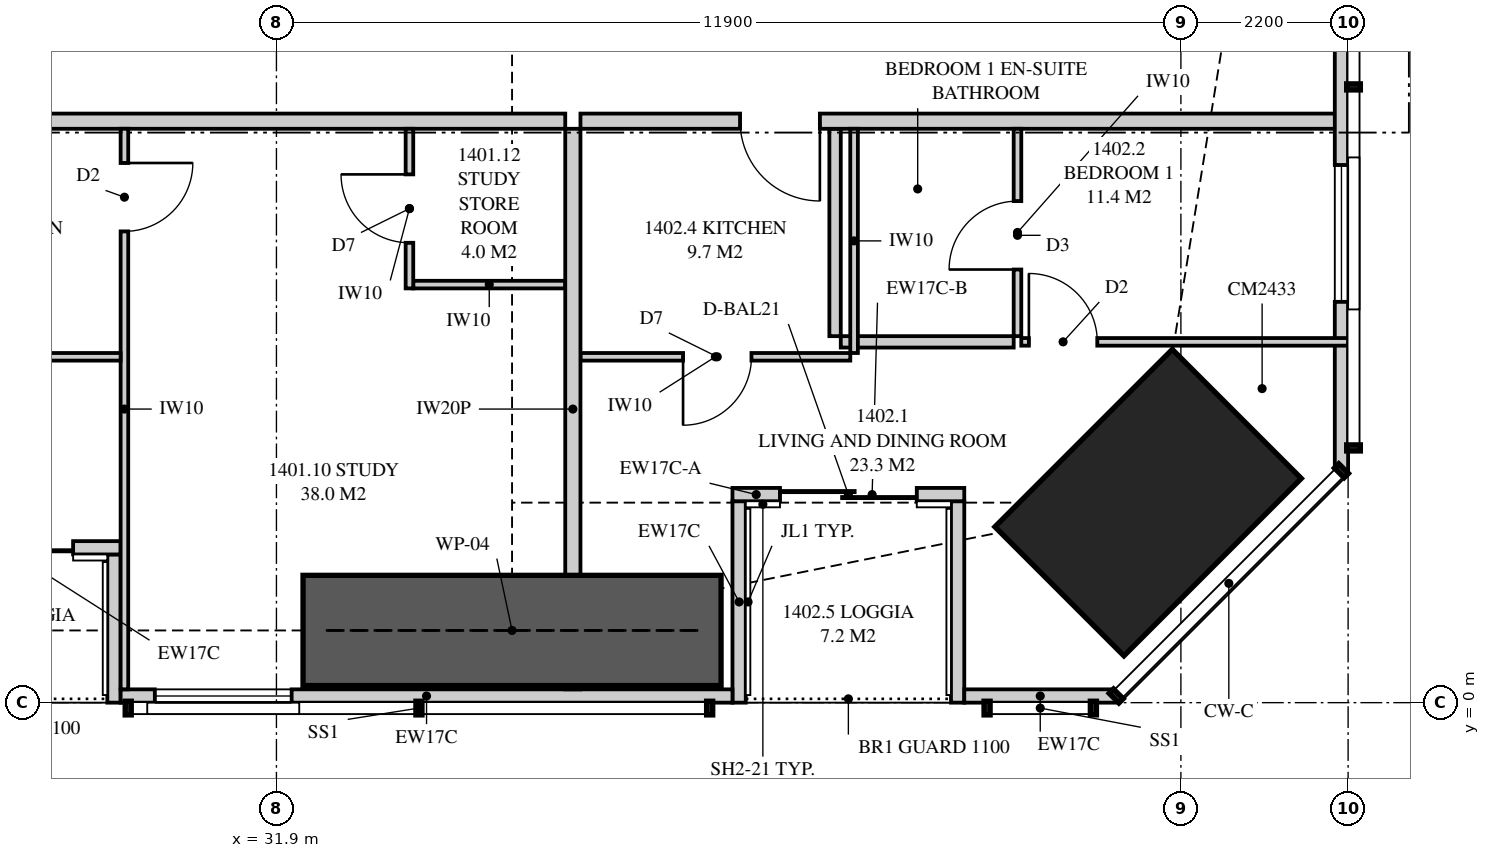
"""IFC4 building model, lengths in metres.
Left out: names, types, materials, properties, quantities, classifications, styles, units other than length and angle.
Written with IfcOpenShell. Run it as: python <this file> out.ifc"""

import sys

from ifc_helpers import new_model, si_unit, direction, frame, frame_2d, origin, origin_2d, place, context, subcontext, project, spatial, polyline, rectangle, outline, extrude, element, fill, save


model = new_model("IFC4")
c1 = context("Model", 3, precision=1e-05, world=origin(), true_north=direction((0.0, 1.0)))
c2 = subcontext(c1, "Body", "Model", "MODEL_VIEW")
j1 = project(units=[si_unit("LENGTHUNIT", "METRE"), si_unit("PLANEANGLEUNIT", "RADIAN")], contexts=[c1])
p1 = place(None, origin())
s1 = spatial("IfcSite", under=j1, at=p1, CompositionType="ELEMENT")
p2 = place(p1, origin())
s2 = spatial("IfcBuilding", under=s1, at=p2, CompositionType="ELEMENT")
p3 = place(p2, frame((0.0, 0.0, 54.5)))
s3 = spatial("IfcBuildingStorey", under=s2, at=p3, CompositionType="ELEMENT", Elevation=54.5)
p4 = place(p3, frame((43.369, 2.631, 0.0), z_axis=(0.0, 0.0, 1.0), x_axis=(-0.707106781187, 0.707106781187, 0.0)))
e1 = element("IfcColumn", 1, at=p4, inside=s3, PredefinedType="COLUMN", context=c2, shape_type="SweptSolid", body=[
    extrude(rectangle(XDim=2.4, YDim=3.3, at=origin_2d()), origin(), (0.0, 0.0, 1.0), 3.35),
])
p5 = place(p3, frame((29.85, 0.087, 0.0), z_axis=(0.0, 0.0, 1.0), x_axis=(1.0, 0.0, 0.0)))
e2 = element("IfcWall", 2, at=p5, inside=s3, PredefinedType="SOLIDWALL", context=c2, shape_type="SweptSolid", body=[
    extrude(outline(polyline([(0.0, 0.0), (8.05, 0.0), (8.05, 3.11), (5.354, 3.11), (5.354, 2.15), (5.306, 2.15), (5.306, 3.11), (5.15, 3.11), (5.15, 2.15), (0.0, 2.15), (0.0, 0.0)])), frame((0.0, 0.087, 0.0), z_axis=(0.0, -1.0, 0.0), x_axis=(1.0, 0.0, 0.0)), (0.0, 0.0, 1.0), 0.175),
])
p6 = place(p5, frame((0.45, 0.0, 0.4)))
e3 = element("IfcOpeningElement", 3, at=p6, cuts=e2, PredefinedType="OPENING", context=c2, shape_type="SweptSolid", body=[
    extrude(rectangle(XDim=1.8, YDim=1.7, at=frame_2d((0.9, 0.85))), frame((0.0, 0.097, 0.0), z_axis=(0.0, -1.0, 0.0), x_axis=(1.0, 0.0, 0.0)), (0.0, 0.0, 1.0), 0.195),
])
p7 = place(p3, frame((40.95, 0.087, 0.0), z_axis=(0.0, 0.0, 1.0), x_axis=(1.0, 0.0, 0.0)))
e4 = element("IfcWall", 4, at=p7, inside=s3, PredefinedType="SOLIDWALL", context=c2, shape_type="SweptSolid", body=[
    extrude(rectangle(XDim=1.999, YDim=0.175, at=frame_2d((1.0, 0.0))), origin(), (0.0, 0.0, 1.0), 3.11),
])
p8 = place(p3, frame((26.8, 2.038, 0.0), z_axis=(0.0, 0.0, 1.0), x_axis=(1.0, 0.0, 0.0)))
e5 = element("IfcWall", 5, at=p8, inside=s3, PredefinedType="SOLIDWALL", context=c2, shape_type="SweptSolid", body=[
    extrude(rectangle(XDim=3.05, YDim=0.175, at=frame_2d((1.525, 0.0))), origin(), (0.0, 0.0, 1.0), 3.11),
])
p9 = place(p8, frame((0.625, 0.0, 0.0)))
e6 = element("IfcOpeningElement", 6, at=p9, cuts=e5, PredefinedType="OPENING", context=c2, shape_type="SweptSolid", body=[
    extrude(rectangle(XDim=1.8, YDim=2.1, at=frame_2d((0.9, 1.05))), frame((0.0, 0.097, 0.0), z_axis=(0.0, -1.0, 0.0), x_axis=(1.0, 0.0, 0.0)), (0.0, 0.0, 1.0), 0.195),
])
p10 = place(p3, frame((29.762, 0.0, 0.0), z_axis=(0.0, 0.0, 1.0), x_axis=(0.0, 1.0, 0.0)))
e7 = element("IfcWall", 7, at=p10, inside=s3, PredefinedType="SOLIDWALL", context=c2, shape_type="SweptSolid", body=[
    extrude(outline(polyline([(0.0, 0.0), (1.95, 0.0), (1.95, 3.11), (1.75, 3.11), (1.75, 2.15), (0.15, 2.15), (0.15, 3.11), (0.0, 3.11), (0.0, 0.0)])), frame((0.0, 0.087, 0.0), z_axis=(0.0, -1.0, 0.0), x_axis=(1.0, 0.0, 0.0)), (0.0, 0.0, 1.0), 0.175),
])
p11 = place(p3, frame((37.9, 2.738, 0.0), z_axis=(0.0, 0.0, 1.0), x_axis=(1.0, 0.0, 0.0)))
e8 = element("IfcWall", 8, at=p11, inside=s3, PredefinedType="SOLIDWALL", context=c2, shape_type="SweptSolid", body=[
    extrude(rectangle(XDim=0.625, YDim=0.175, at=frame_2d((0.312, 0.0))), origin(), (0.0, 0.0, 1.0), 2.51),
])
p12 = place(p3, frame((38.525, 2.738, 0.0), z_axis=(0.0, 0.0, 1.0), x_axis=(1.0, 0.0, 0.0)))
e9 = element("IfcWall", 9, at=p12, inside=s3, PredefinedType="SOLIDWALL", context=c2, shape_type="SweptSolid", body=[
    extrude(rectangle(XDim=2.425, YDim=0.175, at=frame_2d((1.212, 0.0))), origin(), (0.0, 0.0, 1.0), 2.15),
])
p13 = place(p12, origin())
e10 = element("IfcOpeningElement", 10, at=p13, cuts=e9, PredefinedType="OPENING", context=c2, shape_type="SweptSolid", body=[
    extrude(rectangle(XDim=1.8, YDim=2.1, at=frame_2d((0.9, 1.05))), frame((0.0, 0.097, 0.0), z_axis=(0.0, -1.0, 0.0), x_axis=(1.0, 0.0, 0.0)), (0.0, 0.0, 1.0), 0.195),
])
p14 = place(p3, frame((37.988, 0.0, 0.0), z_axis=(0.0, 0.0, 1.0), x_axis=(0.0, 1.0, 0.0)))
e11 = element("IfcWall", 11, at=p14, inside=s3, PredefinedType="SOLIDWALL", context=c2, shape_type="SweptSolid", body=[
    extrude(outline(polyline([(0.0, 0.0), (2.65, 0.0), (2.65, 2.51), (2.384, 2.51), (2.384, 2.15), (0.717, 2.15), (0.717, 3.11), (0.0, 3.11), (0.0, 0.0)])), frame((0.0, 0.087, 0.0), z_axis=(0.0, -1.0, 0.0), x_axis=(1.0, 0.0, 0.0)), (0.0, 0.0, 1.0), 0.175),
])
p15 = place(p3, frame((40.863, 0.0, 0.0), z_axis=(0.0, 0.0, 1.0), x_axis=(0.0, 1.0, 0.0)))
e12 = element("IfcWall", 12, at=p15, inside=s3, PredefinedType="SOLIDWALL", context=c2, shape_type="SweptSolid", body=[
    extrude(outline(polyline([(0.0, 0.0), (2.65, 0.0), (2.65, 2.15), (1.294, 2.15), (1.294, 3.11), (0.0, 3.11), (0.0, 0.0)])), frame((0.0, 0.087, 0.0), z_axis=(0.0, -1.0, 0.0), x_axis=(1.0, 0.0, 0.0)), (0.0, 0.0, 1.0), 0.175),
])
p16 = place(p3, frame((45.913, 3.051, 0.0), z_axis=(0.0, 0.0, 1.0), x_axis=(0.0, 1.0, 0.0)))
e13 = element("IfcWall", 13, at=p16, inside=s3, PredefinedType="SOLIDWALL", context=c2, shape_type="SweptSolid", body=[
    extrude(outline(polyline([(0.0, 0.0), (31.897, 0.0), (31.897, 3.11), (22.167, 3.11), (22.167, 2.15), (22.074, 2.15), (22.074, 3.11), (21.949, 3.11), (21.949, 2.15), (9.949, 2.15), (9.949, 3.11), (9.823, 3.11), (9.823, 2.15), (9.73, 2.15), (9.73, 3.11), (0.0, 3.11), (0.0, 0.0)])), frame((0.0, 0.087, 0.0), z_axis=(0.0, -1.0, 0.0), x_axis=(1.0, 0.0, 0.0)), (0.0, 0.0, 1.0), 0.175),
])
p17 = place(p16, frame((2.222, 0.0, 0.4)))
e14 = element("IfcOpeningElement", 14, at=p17, cuts=e13, PredefinedType="OPENING", context=c2, shape_type="SweptSolid", body=[
    extrude(rectangle(XDim=1.8, YDim=1.7, at=frame_2d((0.9, 0.85))), frame((0.0, 0.097, 0.0), z_axis=(0.0, -1.0, 0.0), x_axis=(1.0, 0.0, 0.0)), (0.0, 0.0, 1.0), 0.195),
])
p18 = place(p16, frame((14.849, 0.0, 0.4)))
e15 = element("IfcOpeningElement", 15, at=p18, cuts=e13, PredefinedType="OPENING", context=c2, shape_type="SweptSolid", body=[
    extrude(rectangle(XDim=1.2, YDim=1.7, at=frame_2d((0.6, 0.85))), frame((0.0, 0.097, 0.0), z_axis=(0.0, -1.0, 0.0), x_axis=(1.0, 0.0, 0.0)), (0.0, 0.0, 1.0), 0.195),
])
p19 = place(p16, frame((27.375, 0.0, 0.4)))
e16 = element("IfcOpeningElement", 16, at=p19, cuts=e13, PredefinedType="OPENING", context=c2, shape_type="SweptSolid", body=[
    extrude(rectangle(XDim=1.8, YDim=1.7, at=frame_2d((0.9, 0.85))), frame((0.0, 0.097, 0.0), z_axis=(0.0, -1.0, 0.0), x_axis=(1.0, 0.0, 0.0)), (0.0, 0.0, 1.0), 0.195),
])
p20 = place(p3, frame((35.8, 0.175, 0.0), z_axis=(0.0, 0.0, 1.0), x_axis=(0.0, 1.0, 0.0)))
e17 = element("IfcWall", 17, at=p20, inside=s3, PredefinedType="PARTITIONING", context=c2, shape_type="SweptSolid", body=[
    extrude(outline(polyline([(0.008, 3.11), (0.0, 3.11), (0.0, 0.0), (0.529, 0.0), (0.529, 0.957), (1.021, 0.957), (1.021, 0.0), (7.375, 0.0), (7.375, 3.11), (3.766, 3.11), (3.766, 2.51), (1.864, 2.51), (1.864, 2.15), (1.021, 2.15), (1.021, 1.193), (0.529, 1.193), (0.529, 2.15), (0.008, 2.15), (0.008, 3.11)])), frame((0.0, 0.1, 0.0), z_axis=(0.0, -1.0, 0.0), x_axis=(1.0, 0.0, 0.0)), (0.0, 0.0, 1.0), 0.2),
])
p21 = place(p3, frame((29.9, 0.175, 0.0), z_axis=(0.0, 0.0, 1.0), x_axis=(0.0, 1.0, 0.0)))
e18 = element("IfcWall", 18, at=p21, inside=s3, PredefinedType="PARTITIONING", context=c2, shape_type="SweptSolid", body=[
    extrude(outline(polyline([(0.0, 0.0), (7.375, 0.0), (7.375, 3.11), (1.635, 3.11), (1.635, 2.15), (0.0, 2.15), (0.0, 3.11), (0.0, 0.0)])), frame((0.0, 0.05, 0.0), z_axis=(0.0, -1.0, 0.0), x_axis=(1.0, 0.0, 0.0)), (0.0, 0.0, 1.0), 0.1),
])
p22 = place(p21, frame((6.025, 0.0, 0.0)))
e19 = element("IfcOpeningElement", 19, at=p22, cuts=e18, PredefinedType="OPENING", context=c2, shape_type="SweptSolid", body=[
    extrude(rectangle(XDim=0.9, YDim=2.1, at=frame_2d((0.45, 1.05))), frame((0.0, 0.06, 0.0), z_axis=(0.0, -1.0, 0.0), x_axis=(1.0, 0.0, 0.0)), (0.0, 0.0, 1.0), 0.12),
])
p23 = place(p3, frame((26.35, 4.55, 0.0), z_axis=(0.0, 0.0, 1.0), x_axis=(1.0, 0.0, 0.0)))
e20 = element("IfcWall", 20, at=p23, inside=s3, PredefinedType="PARTITIONING", context=c2, shape_type="SweptSolid", body=[
    extrude(rectangle(XDim=3.5, YDim=0.1, at=frame_2d((1.75, 0.0))), origin(), (0.0, 0.0, 1.0), 3.11),
])
p24 = place(p23, frame((1.3, 0.0, 0.0)))
e21 = element("IfcOpeningElement", 21, at=p24, cuts=e20, PredefinedType="OPENING", context=c2, shape_type="SweptSolid", body=[
    extrude(rectangle(XDim=0.9, YDim=2.1, at=frame_2d((0.45, 1.05))), frame((0.0, 0.06, 0.0), z_axis=(0.0, -1.0, 0.0), x_axis=(1.0, 0.0, 0.0)), (0.0, 0.0, 1.0), 0.12),
])
p25 = place(p3, frame((35.9, 7.65, 0.0), z_axis=(0.0, 0.0, 1.0), x_axis=(1.0, 0.0, 0.0)))
e22 = element("IfcWall", 22, at=p25, inside=s3, PredefinedType="PARTITIONING", context=c2, shape_type="SweptSolid", body=[
    extrude(outline(polyline([(0.0, 0.0), (10.1, 0.0), (10.1, 3.11), (9.204, 3.11), (9.204, 2.15), (7.361, 2.15), (7.361, 3.11), (0.0, 3.11), (0.0, 0.0)])), frame((0.0, 0.1, 0.0), z_axis=(0.0, -1.0, 0.0), x_axis=(1.0, 0.0, 0.0)), (0.0, 0.0, 1.0), 0.2),
])
p26 = place(p25, frame((2.1, 0.0, 0.0)))
e23 = element("IfcOpeningElement", 23, at=p26, cuts=e22, PredefinedType="OPENING", context=c2, shape_type="SweptSolid", body=[
    extrude(rectangle(XDim=1.05, YDim=2.2, at=frame_2d((0.525, 1.1))), frame((0.0, 0.11, 0.0), z_axis=(0.0, -1.0, 0.0), x_axis=(1.0, 0.0, 0.0)), (0.0, 0.0, 1.0), 0.22),
])
p27 = place(p3, frame((41.65, 4.822, 0.0), z_axis=(0.0, 0.0, 1.0), x_axis=(0.0, 1.0, 0.0)))
e24 = element("IfcWall", 24, at=p27, inside=s3, PredefinedType="PARTITIONING", context=c2, shape_type="SweptSolid", body=[
    extrude(rectangle(XDim=2.728, YDim=0.1, at=frame_2d((1.364, 0.0))), origin(), (0.0, 0.0, 1.0), 3.11),
])
p28 = place(p27, frame((0.877, 0.0, 0.0)))
e25 = element("IfcOpeningElement", 25, at=p28, cuts=e24, PredefinedType="OPENING", context=c2, shape_type="SweptSolid", body=[
    extrude(rectangle(XDim=0.9, YDim=2.1, at=frame_2d((0.45, 1.05))), frame((0.0, 0.06, 0.0), z_axis=(0.0, -1.0, 0.0), x_axis=(1.0, 0.0, 0.0)), (0.0, 0.0, 1.0), 0.12),
])
p29 = place(p3, frame((41.7, 4.747, 0.0), z_axis=(0.0, 0.0, 1.0), x_axis=(1.0, 0.0, 0.0)))
e26 = element("IfcWall", 26, at=p29, inside=s3, PredefinedType="PARTITIONING", context=c2, shape_type="SweptSolid", body=[
    extrude(outline(polyline([(0.0, 0.0), (4.3, 0.0), (4.3, 3.11), (2.883, 3.11), (2.883, 2.15), (1.14, 2.15), (1.14, 3.11), (0.0, 3.11), (0.0, 0.0)])), frame((0.0, 0.05, 0.0), z_axis=(0.0, -1.0, 0.0), x_axis=(1.0, 0.0, 0.0)), (0.0, 0.0, 1.0), 0.1),
])
p30 = place(p29, frame((0.1, 0.0, 0.0)))
e27 = element("IfcOpeningElement", 27, at=p30, cuts=e26, PredefinedType="OPENING", context=c2, shape_type="SweptSolid", body=[
    extrude(rectangle(XDim=0.9, YDim=2.1, at=frame_2d((0.45, 1.05))), frame((0.0, 0.06, 0.0), z_axis=(0.0, -1.0, 0.0), x_axis=(1.0, 0.0, 0.0)), (0.0, 0.0, 1.0), 0.12),
])
p31 = place(p3, frame((39.325, 4.747, 0.0), z_axis=(0.0, 0.0, 1.0), x_axis=(1.0, 0.0, 0.0)))
e28 = element("IfcWall", 28, at=p31, inside=s3, PredefinedType="PLUMBINGWALL", context=c2, shape_type="SweptSolid", body=[
    extrude(rectangle(XDim=2.275, YDim=0.15, at=frame_2d((1.138, 0.0))), origin(), (0.0, 0.0, 1.0), 3.11),
])
p32 = place(p3, frame((39.25, 4.822, 0.0), z_axis=(0.0, 0.0, 1.0), x_axis=(0.0, 1.0, 0.0)))
e29 = element("IfcWall", 29, at=p32, inside=s3, PredefinedType="PLUMBINGWALL", context=c2, shape_type="SweptSolid", body=[
    extrude(rectangle(XDim=2.728, YDim=0.15, at=frame_2d((1.364, 0.0))), origin(), (0.0, 0.0, 1.0), 3.11),
])
p33 = place(p3, frame((35.9, 4.55, 0.0), z_axis=(0.0, 0.0, 1.0), x_axis=(1.0, 0.0, 0.0)))
e30 = element("IfcWall", 30, at=p33, inside=s3, PredefinedType="PARTITIONING", context=c2, shape_type="SweptSolid", body=[
    extrude(rectangle(XDim=3.55, YDim=0.1, at=frame_2d((1.775, 0.0))), origin(), (0.0, 0.0, 1.0), 3.11),
])
p34 = place(p33, frame((1.35, 0.0, 0.0)))
e31 = element("IfcOpeningElement", 31, at=p34, cuts=e30, PredefinedType="OPENING", context=c2, shape_type="SweptSolid", body=[
    extrude(rectangle(XDim=0.9, YDim=2.1, at=frame_2d((0.45, 1.05))), frame((0.0, 0.06, 0.0), z_axis=(0.0, -1.0, 0.0), x_axis=(1.0, 0.0, 0.0)), (0.0, 0.0, 1.0), 0.12),
])
p35 = place(p3, frame((39.5, 4.6, 0.0), z_axis=(0.0, 0.0, 1.0), x_axis=(0.0, 1.0, 0.0)))
e32 = element("IfcWall", 32, at=p35, inside=s3, PredefinedType="PARTITIONING", context=c2, shape_type="SweptSolid", body=[
    extrude(rectangle(XDim=2.95, YDim=0.1, at=frame_2d((1.475, 0.0))), origin(), (0.0, 0.0, 1.0), 3.11),
])
p36 = place(p3, frame((24.05, 7.65, 0.0), z_axis=(0.0, 0.0, 1.0), x_axis=(1.0, 0.0, 0.0)))
e33 = element("IfcWall", 33, at=p36, inside=s3, PredefinedType="PARTITIONING", context=c2, shape_type="SweptSolid", body=[
    extrude(outline(polyline([(0.0, 0.0), (11.65, 0.0), (11.65, 3.11), (11.287, 3.11), (11.287, 2.541), (10.613, 2.541), (10.613, 3.11), (0.287, 3.11), (0.287, 2.541), (0.0, 2.541), (0.0, 3.11), (0.0, 0.0)])), frame((0.0, 0.1, 0.0), z_axis=(0.0, -1.0, 0.0), x_axis=(1.0, 0.0, 0.0)), (0.0, 0.0, 1.0), 0.2),
])
p37 = place(p3, frame((33.65, 7.55, 0.0), z_axis=(0.0, 0.0, 1.0), x_axis=(0.0, -1.0, 0.0)))
e34 = element("IfcWall", 34, at=p37, inside=s3, PredefinedType="PARTITIONING", context=c2, shape_type="SweptSolid", body=[
    extrude(rectangle(XDim=2.1, YDim=0.1, at=frame_2d((1.05, 0.0))), origin(), (0.0, 0.0, 1.0), 3.11),
])
p38 = place(p37, frame((0.6, 0.0, 0.0)))
e35 = element("IfcOpeningElement", 35, at=p38, cuts=e34, PredefinedType="OPENING", context=c2, shape_type="SweptSolid", body=[
    extrude(rectangle(XDim=0.9, YDim=2.1, at=frame_2d((0.45, 1.05))), frame((0.0, 0.06, 0.0), z_axis=(0.0, -1.0, 0.0), x_axis=(1.0, 0.0, 0.0)), (0.0, 0.0, 1.0), 0.12),
])
p39 = place(p3, frame((35.7, 5.5, 0.0), z_axis=(0.0, 0.0, 1.0), x_axis=(-1.0, 0.0, 0.0)))
e36 = element("IfcWall", 36, at=p39, inside=s3, PredefinedType="PARTITIONING", context=c2, shape_type="SweptSolid", body=[
    extrude(outline(polyline([(0.0, 0.0), (2.0, 0.0), (2.0, 3.11), (0.987, 3.11), (0.987, 2.541), (0.413, 2.541), (0.413, 3.11), (0.0, 3.11), (0.0, 0.0)])), frame((0.0, 0.05, 0.0), z_axis=(0.0, -1.0, 0.0), x_axis=(1.0, 0.0, 0.0)), (0.0, 0.0, 1.0), 0.1),
])
p40 = place(p3, frame((32.25, 0.95, 0.0), z_axis=(0.0, 0.0, 1.0), x_axis=(1.0, 0.0, 0.0)))
e37 = element("IfcWall", 37, at=p40, inside=s3, PredefinedType="SHEAR", context=c2, shape_type="SweptSolid", body=[
    extrude(rectangle(XDim=5.5, YDim=1.45, at=frame_2d((2.75, 0.0))), origin(), (0.0, 0.0, 1.0), 3.35),
])
p41 = place(p9, origin())
e38 = element("IfcDoor", 38, at=p41, inside=s3, OperationType="SLIDING_TO_LEFT", PredefinedType="DOOR", context=c2, shape_type="SweptSolid", body=[
    extrude(rectangle(XDim=1.8, YDim=2.1, at=frame_2d((0.9, 1.05))), frame((0.0, 0.025, 0.0), z_axis=(0.0, -1.0, 0.0), x_axis=(1.0, 0.0, 0.0)), (0.0, 0.0, 1.0), 0.05),
])
fill(e6, e38)
p42 = place(p6, origin())
e39 = element("IfcWindow", 39, at=p42, inside=s3, PartitioningType="SINGLE_PANEL", PredefinedType="WINDOW", context=c2, shape_type="SweptSolid", body=[
    extrude(rectangle(XDim=1.8, YDim=1.7, at=frame_2d((0.9, 0.85))), frame((0.0, 0.03, 0.0), z_axis=(0.0, -1.0, 0.0), x_axis=(1.0, 0.0, 0.0)), (0.0, 0.0, 1.0), 0.06),
])
fill(e3, e39)
p43 = place(p13, origin())
e40 = element("IfcDoor", 40, at=p43, inside=s3, OperationType="SLIDING_TO_LEFT", PredefinedType="DOOR", context=c2, shape_type="SweptSolid", body=[
    extrude(rectangle(XDim=1.8, YDim=2.1, at=frame_2d((0.9, 1.05))), frame((0.0, 0.025, 0.0), z_axis=(0.0, -1.0, 0.0), x_axis=(1.0, 0.0, 0.0)), (0.0, 0.0, 1.0), 0.05),
])
fill(e10, e40)
p44 = place(p17, origin())
e41 = element("IfcWindow", 41, at=p44, inside=s3, PartitioningType="SINGLE_PANEL", PredefinedType="WINDOW", context=c2, shape_type="SweptSolid", body=[
    extrude(rectangle(XDim=1.8, YDim=1.7, at=frame_2d((0.9, 0.85))), frame((0.0, 0.03, 0.0), z_axis=(0.0, -1.0, 0.0), x_axis=(1.0, 0.0, 0.0)), (0.0, 0.0, 1.0), 0.06),
])
fill(e14, e41)
p45 = place(p22, frame((0.9, 0.0, 0.0), z_axis=(0.0, 0.0, 1.0), x_axis=(-1.0, 0.0, 0.0)))
e42 = element("IfcDoor", 42, at=p45, inside=s3, OperationType="SINGLE_SWING_LEFT", PredefinedType="DOOR", context=c2, shape_type="SweptSolid", body=[
    extrude(rectangle(XDim=0.9, YDim=2.1, at=frame_2d((0.45, 1.05))), frame((0.0, 0.025, 0.0), z_axis=(0.0, -1.0, 0.0), x_axis=(1.0, 0.0, 0.0)), (0.0, 0.0, 1.0), 0.05),
])
fill(e19, e42)
p46 = place(p26, frame((1.05, 0.0, 0.0), z_axis=(0.0, 0.0, 1.0), x_axis=(-1.0, 0.0, 0.0)))
e43 = element("IfcDoor", 43, at=p46, inside=s3, OperationType="SINGLE_SWING_LEFT", PredefinedType="DOOR", context=c2, shape_type="SweptSolid", body=[
    extrude(rectangle(XDim=1.05, YDim=2.2, at=frame_2d((0.525, 1.1))), frame((0.0, 0.025, 0.0), z_axis=(0.0, -1.0, 0.0), x_axis=(1.0, 0.0, 0.0)), (0.0, 0.0, 1.0), 0.05),
])
fill(e23, e43)
p47 = place(p30, origin())
e44 = element("IfcDoor", 44, at=p47, inside=s3, OperationType="SINGLE_SWING_LEFT", PredefinedType="DOOR", context=c2, shape_type="SweptSolid", body=[
    extrude(rectangle(XDim=0.9, YDim=2.1, at=frame_2d((0.45, 1.05))), frame((0.0, 0.025, 0.0), z_axis=(0.0, -1.0, 0.0), x_axis=(1.0, 0.0, 0.0)), (0.0, 0.0, 1.0), 0.05),
])
fill(e27, e44)
p48 = place(p28, origin())
e45 = element("IfcDoor", 45, at=p48, inside=s3, OperationType="SINGLE_SWING_LEFT", PredefinedType="DOOR", context=c2, shape_type="SweptSolid", body=[
    extrude(rectangle(XDim=0.9, YDim=2.1, at=frame_2d((0.45, 1.05))), frame((0.0, 0.025, 0.0), z_axis=(0.0, -1.0, 0.0), x_axis=(1.0, 0.0, 0.0)), (0.0, 0.0, 1.0), 0.05),
])
fill(e25, e45)
p49 = place(p34, frame((0.9, 0.0, 0.0), z_axis=(0.0, 0.0, 1.0), x_axis=(-1.0, 0.0, 0.0)))
e46 = element("IfcDoor", 46, at=p49, inside=s3, OperationType="SINGLE_SWING_RIGHT", PredefinedType="DOOR", context=c2, shape_type="SweptSolid", body=[
    extrude(rectangle(XDim=0.9, YDim=2.1, at=frame_2d((0.45, 1.05))), frame((0.0, 0.025, 0.0), z_axis=(0.0, -1.0, 0.0), x_axis=(1.0, 0.0, 0.0)), (0.0, 0.0, 1.0), 0.05),
])
fill(e31, e46)
p50 = place(p38, frame((0.9, 0.0, 0.0), z_axis=(0.0, 0.0, 1.0), x_axis=(-1.0, 0.0, 0.0)))
e47 = element("IfcDoor", 47, at=p50, inside=s3, OperationType="SINGLE_SWING_RIGHT", PredefinedType="DOOR", context=c2, shape_type="SweptSolid", body=[
    extrude(rectangle(XDim=0.9, YDim=2.1, at=frame_2d((0.45, 1.05))), frame((0.0, 0.025, 0.0), z_axis=(0.0, -1.0, 0.0), x_axis=(1.0, 0.0, 0.0)), (0.0, 0.0, 1.0), 0.05),
])
fill(e35, e47)
save(model, sys.argv[1])
